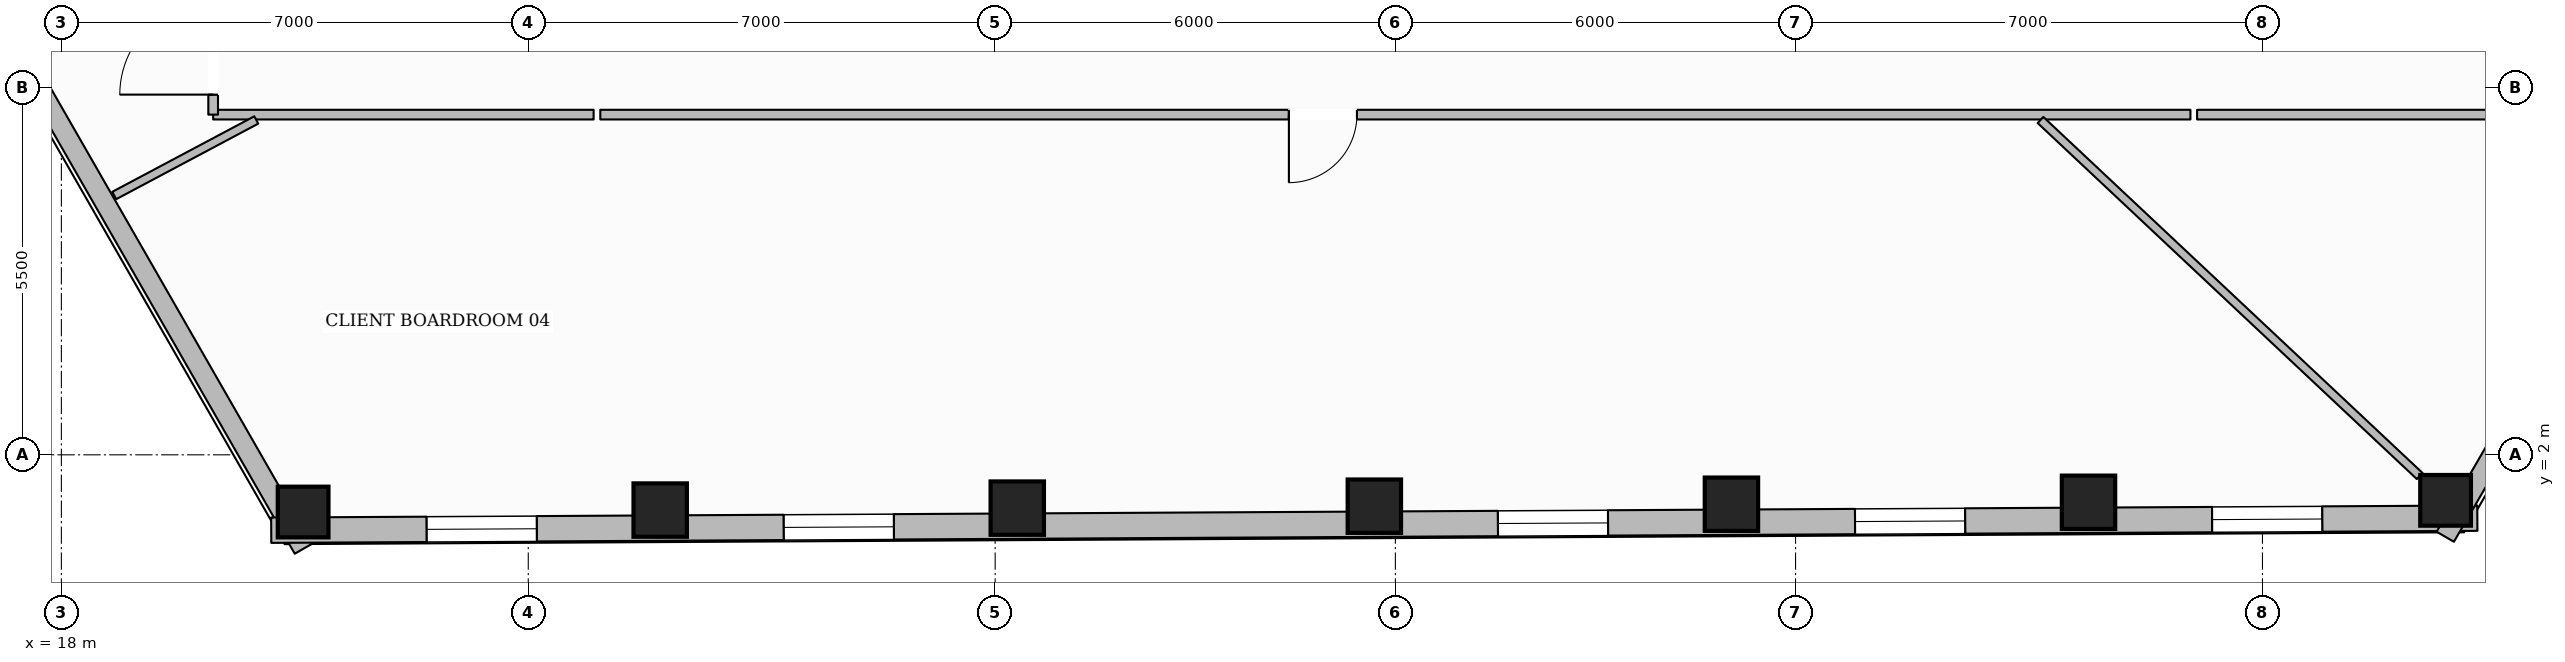
"""IFC4 building model, lengths in metres.
Left out: names, types, materials, properties, quantities, classifications, styles, units other than length and angle.
Written with IfcOpenShell. Run it as: python <this file> out.ifc"""

import sys

from ifc_helpers import new_model, si_unit, direction, frame, frame_2d, origin, origin_2d, place, context, subcontext, project, spatial, rectangle, hollow_rectangle, extrude, element, fill, save


model = new_model("IFC4")
c1 = context("Model", 3, precision=1e-05, world=origin(), true_north=direction((0.0, 1.0)))
c2 = subcontext(c1, "Body", "Model", "MODEL_VIEW")
j1 = project(units=[si_unit("LENGTHUNIT", "METRE"), si_unit("PLANEANGLEUNIT", "RADIAN")], contexts=[c1])
p1 = place(None, origin())
s1 = spatial("IfcSite", under=j1, at=p1, CompositionType="ELEMENT")
p2 = place(p1, origin())
s2 = spatial("IfcBuilding", under=s1, at=p2, CompositionType="ELEMENT")
p3 = place(p2, frame((0.0, 0.0, 6.0)))
s3 = spatial("IfcBuildingStorey", under=s2, at=p3, CompositionType="ELEMENT", Elevation=6.0)
p4 = place(p3, frame((21.625, 1.142, 0.0), z_axis=(0.0, 0.0, 1.0), x_axis=(1.0, 0.0, 0.0)))
e1 = element("IfcColumn", 1, at=p4, inside=s3, PredefinedType="COLUMN", context=c2, shape_type="SweptSolid", body=[
    extrude(hollow_rectangle(XDim=0.76, YDim=0.76, WallThickness=0.035, at=origin_2d()), origin(), (0.0, 0.0, 1.0), 3.59),
])
for number, where, z_axis, x_axis in (
    (2, (26.978, 1.172, 0.0), (0.0, 0.0, 1.0), (1.0, 0.0, 0.0)),
    (3, (32.332, 1.201, 0.0), (0.0, 0.0, 1.0), (1.0, 0.0, 0.0)),
    (4, (37.685, 1.23, 0.0), (0.0, 0.0, 1.0), (1.0, 0.0, 0.0)),
    (5, (43.039, 1.259, 0.0), (0.0, 0.0, 1.0), (1.0, 0.0, 0.0)),
    (6, (48.392, 1.288, 0.0), (0.0, 0.0, 1.0), (1.0, 0.0, 0.0)),
):
    element("IfcColumn", number, at=place(p3, frame(where, z_axis=z_axis, x_axis=x_axis)), inside=s3, PredefinedType="COLUMN", context=c2, shape_type="SweptSolid", body=[
        extrude(hollow_rectangle(XDim=0.8, YDim=0.8, WallThickness=0.036, at=origin_2d()), origin(), (0.0, 0.0, 1.0), 3.59),
    ])
p5 = place(p3, frame((53.746, 1.318, 0.0), z_axis=(0.0, 0.0, 1.0), x_axis=(1.0, 0.0, 0.0)))
e7 = element("IfcColumn", 7, at=p5, inside=s3, PredefinedType="COLUMN", context=c2, shape_type="SweptSolid", body=[
    extrude(hollow_rectangle(XDim=0.76, YDim=0.76, WallThickness=0.035, at=origin_2d()), origin(), (0.0, 0.0, 1.0), 3.59),
])
p6 = place(p3, frame((21.629, 0.592, 0.0), z_axis=(0.0, 0.0, 1.0), x_axis=(-0.497614882017, 0.867398080004, 0.0)))
e8 = element("IfcWall", 8, at=p6, inside=s3, PredefinedType="STANDARD", context=c2, shape_type="SweptSolid", body=[
    extrude(rectangle(XDim=17.324, YDim=0.3, at=frame_2d((8.662, 0.0))), origin(), (0.0, 0.0, 1.0), 2.97),
])
p7 = place(p6, frame((8.062, 0.0, 0.65)))
e9 = element("IfcOpeningElement", 9, at=p7, cuts=e8, PredefinedType="OPENING", context=c2, shape_type="SweptSolid", body=[
    extrude(rectangle(XDim=1.2, YDim=1.7, at=frame_2d((0.6, 0.85))), frame((0.0, 0.16, 0.0), z_axis=(0.0, -1.0, 0.0), x_axis=(1.0, 0.0, 0.0)), (0.0, 0.0, 1.0), 0.32),
])
p8 = place(p3, frame((54.221, 1.05, 0.0), z_axis=(0.0, 0.0, 1.0), x_axis=(-0.999985122688, -0.005454759556, 0.0)))
e10 = element("IfcWall", 10, at=p8, inside=s3, PredefinedType="STANDARD", context=c2, shape_type="SweptSolid", body=[
    extrude(rectangle(XDim=33.076, YDim=0.38, at=frame_2d((16.538, 0.0))), origin(), (0.0, 0.0, 1.0), 2.97),
])
p9 = place(p8, frame((29.094, 0.0, 0.65)))
e11 = element("IfcOpeningElement", 11, at=p9, cuts=e10, PredefinedType="OPENING", context=c2, shape_type="SweptSolid", body=[
    extrude(rectangle(XDim=1.65, YDim=1.75, at=frame_2d((0.825, 0.875))), frame((0.0, 0.2, 0.0), z_axis=(0.0, -1.0, 0.0), x_axis=(1.0, 0.0, 0.0)), (0.0, 0.0, 1.0), 0.4),
])
p10 = place(p8, frame((23.74, 0.0, 0.65)))
e12 = element("IfcOpeningElement", 12, at=p10, cuts=e10, PredefinedType="OPENING", context=c2, shape_type="SweptSolid", body=[
    extrude(rectangle(XDim=1.65, YDim=1.75, at=frame_2d((0.825, 0.875))), frame((0.0, 0.2, 0.0), z_axis=(0.0, -1.0, 0.0), x_axis=(1.0, 0.0, 0.0)), (0.0, 0.0, 1.0), 0.4),
])
p11 = place(p8, frame((13.033, 0.0, 0.65)))
e13 = element("IfcOpeningElement", 13, at=p11, cuts=e10, PredefinedType="OPENING", context=c2, shape_type="SweptSolid", body=[
    extrude(rectangle(XDim=1.65, YDim=1.75, at=frame_2d((0.825, 0.875))), frame((0.0, 0.2, 0.0), z_axis=(0.0, -1.0, 0.0), x_axis=(1.0, 0.0, 0.0)), (0.0, 0.0, 1.0), 0.4),
])
p12 = place(p8, frame((7.68, 0.0, 0.65)))
e14 = element("IfcOpeningElement", 14, at=p12, cuts=e10, PredefinedType="OPENING", context=c2, shape_type="SweptSolid", body=[
    extrude(rectangle(XDim=1.65, YDim=1.75, at=frame_2d((0.825, 0.875))), frame((0.0, 0.2, 0.0), z_axis=(0.0, -1.0, 0.0), x_axis=(1.0, 0.0, 0.0)), (0.0, 0.0, 1.0), 0.4),
])
p13 = place(p8, frame((2.326, 0.0, 0.65)))
e15 = element("IfcOpeningElement", 15, at=p13, cuts=e10, PredefinedType="OPENING", context=c2, shape_type="SweptSolid", body=[
    extrude(rectangle(XDim=1.65, YDim=1.75, at=frame_2d((0.825, 0.875))), frame((0.0, 0.2, 0.0), z_axis=(0.0, -1.0, 0.0), x_axis=(1.0, 0.0, 0.0)), (0.0, 0.0, 1.0), 0.4),
])
p14 = place(p3, frame((62.524, 15.89, 0.0), z_axis=(0.0, 0.0, 1.0), x_axis=(-0.502350077129, -0.864664327938, 0.0)))
e16 = element("IfcWall", 16, at=p14, inside=s3, PredefinedType="STANDARD", context=c2, shape_type="SweptSolid", body=[
    extrude(rectangle(XDim=17.485, YDim=0.3, at=frame_2d((8.742, 0.0))), origin(), (0.0, 0.0, 1.0), 2.97),
])
p15 = place(p14, frame((8.142, 0.0, 0.65)))
e17 = element("IfcOpeningElement", 17, at=p15, cuts=e16, PredefinedType="OPENING", context=c2, shape_type="SweptSolid", body=[
    extrude(rectangle(XDim=1.2, YDim=1.7, at=frame_2d((0.6, 0.85))), frame((0.0, 0.16, 0.0), z_axis=(0.0, -1.0, 0.0), x_axis=(1.0, 0.0, 0.0)), (0.0, 0.0, 1.0), 0.32),
])
p16 = place(p3, frame((55.04, 7.1, 0.0), z_axis=(0.0, 0.0, 1.0), x_axis=(-1.0, 0.0, 0.0)))
e18 = element("IfcWall", 18, at=p16, inside=s3, PredefinedType="PARTITIONING", context=c2, shape_type="SweptSolid", body=[
    extrude(rectangle(XDim=5.02, YDim=0.145, at=frame_2d((2.51, 0.0))), origin(), (0.0, 0.0, 1.0), 3.59),
])
p17 = place(p3, frame((49.92, 7.1, 0.0), z_axis=(0.0, 0.0, 1.0), x_axis=(-1.0, 0.0, 0.0)))
e19 = element("IfcWall", 19, at=p17, inside=s3, PredefinedType="PARTITIONING", context=c2, shape_type="SweptSolid", body=[
    extrude(rectangle(XDim=23.84, YDim=0.145, at=frame_2d((11.92, 0.0))), origin(), (0.0, 0.0, 1.0), 3.278),
])
p18 = place(p17, frame((12.496, 0.0, 0.0)))
e20 = element("IfcOpeningElement", 20, at=p18, cuts=e19, PredefinedType="OPENING", context=c2, shape_type="SweptSolid", body=[
    extrude(rectangle(XDim=1.02, YDim=2.15, at=frame_2d((0.51, 1.075))), frame((0.0, 0.083, 0.0), z_axis=(0.0, -1.0, 0.0), x_axis=(1.0, 0.0, 0.0)), (0.0, 0.0, 1.0), 0.165),
])
p19 = place(p3, frame((25.98, 7.1, 0.0), z_axis=(0.0, 0.0, 1.0), x_axis=(-1.0, 0.0, 0.0)))
e21 = element("IfcWall", 21, at=p19, inside=s3, PredefinedType="PARTITIONING", context=c2, shape_type="SweptSolid", body=[
    extrude(rectangle(XDim=5.704, YDim=0.145, at=frame_2d((2.852, 0.0))), origin(), (0.0, 0.0, 1.0), 3.59),
])
p20 = place(p3, frame((20.276, 7.1, 0.0), z_axis=(0.0, 0.0, 1.0), x_axis=(0.0, 1.0, 0.0)))
e22 = element("IfcWall", 22, at=p20, inside=s3, PredefinedType="PARTITIONING", context=c2, shape_type="SweptSolid", body=[
    extrude(rectangle(XDim=2.0, YDim=0.145, at=frame_2d((1.0, 0.0))), origin(), (0.0, 0.0, 1.0), 3.59),
])
p21 = place(p20, frame((0.3, 0.0, 0.0)))
e23 = element("IfcOpeningElement", 23, at=p21, cuts=e22, PredefinedType="OPENING", context=c2, shape_type="SweptSolid", body=[
    extrude(rectangle(XDim=1.4, YDim=2.2, at=frame_2d((0.7, 1.1))), frame((0.0, 0.083, 0.0), z_axis=(0.0, -1.0, 0.0), x_axis=(1.0, 0.0, 0.0)), (0.0, 0.0, 1.0), 0.165),
])
p22 = place(p3, frame((20.922, 7.02, 0.0), z_axis=(0.0, 0.0, 1.0), x_axis=(-0.882971496937, -0.469426602992, 0.0)))
e24 = element("IfcWall", 24, at=p22, inside=s3, PredefinedType="PARTITIONING", context=c2, shape_type="SweptSolid", body=[
    extrude(rectangle(XDim=2.412, YDim=0.125, at=frame_2d((1.206, 0.0))), origin(), (0.0, 0.0, 1.0), 3.59),
])
p23 = place(p3, frame((47.672, 7.02, 0.0), z_axis=(0.0, 0.0, 1.0), x_axis=(0.729045932386, -0.684464775186, 0.0)))
e25 = element("IfcWall", 25, at=p23, inside=s3, PredefinedType="PARTITIONING", context=c2, shape_type="SweptSolid", body=[
    extrude(rectangle(XDim=7.798, YDim=0.125, at=frame_2d((3.899, 0.0))), origin(), (0.0, 0.0, 1.0), 3.057),
])
p24 = place(p9, origin())
e26 = element("IfcWindow", 26, at=p24, inside=s3, PartitioningType="SINGLE_PANEL", PredefinedType="WINDOW", context=c2, shape_type="SweptSolid", body=[
    extrude(rectangle(XDim=1.65, YDim=1.75, at=frame_2d((0.825, 0.875))), frame((0.0, 0.03, 0.0), z_axis=(0.0, -1.0, 0.0), x_axis=(1.0, 0.0, 0.0)), (0.0, 0.0, 1.0), 0.06),
])
fill(e11, e26)
p25 = place(p10, origin())
e27 = element("IfcWindow", 27, at=p25, inside=s3, PartitioningType="SINGLE_PANEL", PredefinedType="WINDOW", context=c2, shape_type="SweptSolid", body=[
    extrude(rectangle(XDim=1.65, YDim=1.75, at=frame_2d((0.825, 0.875))), frame((0.0, 0.03, 0.0), z_axis=(0.0, -1.0, 0.0), x_axis=(1.0, 0.0, 0.0)), (0.0, 0.0, 1.0), 0.06),
])
fill(e12, e27)
p26 = place(p11, origin())
e28 = element("IfcWindow", 28, at=p26, inside=s3, PartitioningType="SINGLE_PANEL", PredefinedType="WINDOW", context=c2, shape_type="SweptSolid", body=[
    extrude(rectangle(XDim=1.65, YDim=1.75, at=frame_2d((0.825, 0.875))), frame((0.0, 0.03, 0.0), z_axis=(0.0, -1.0, 0.0), x_axis=(1.0, 0.0, 0.0)), (0.0, 0.0, 1.0), 0.06),
])
fill(e13, e28)
p27 = place(p12, origin())
e29 = element("IfcWindow", 29, at=p27, inside=s3, PartitioningType="SINGLE_PANEL", PredefinedType="WINDOW", context=c2, shape_type="SweptSolid", body=[
    extrude(rectangle(XDim=1.65, YDim=1.75, at=frame_2d((0.825, 0.875))), frame((0.0, 0.03, 0.0), z_axis=(0.0, -1.0, 0.0), x_axis=(1.0, 0.0, 0.0)), (0.0, 0.0, 1.0), 0.06),
])
fill(e14, e29)
p28 = place(p13, origin())
e30 = element("IfcWindow", 30, at=p28, inside=s3, PartitioningType="SINGLE_PANEL", PredefinedType="WINDOW", context=c2, shape_type="SweptSolid", body=[
    extrude(rectangle(XDim=1.65, YDim=1.75, at=frame_2d((0.825, 0.875))), frame((0.0, 0.03, 0.0), z_axis=(0.0, -1.0, 0.0), x_axis=(1.0, 0.0, 0.0)), (0.0, 0.0, 1.0), 0.06),
])
fill(e15, e30)
p29 = place(p21, origin())
e31 = element("IfcDoor", 31, at=p29, inside=s3, OperationType="SINGLE_SWING_LEFT", PredefinedType="DOOR", context=c2, shape_type="SweptSolid", body=[
    extrude(rectangle(XDim=1.4, YDim=2.2, at=frame_2d((0.7, 1.1))), frame((0.0, 0.025, 0.0), z_axis=(0.0, -1.0, 0.0), x_axis=(1.0, 0.0, 0.0)), (0.0, 0.0, 1.0), 0.05),
])
fill(e23, e31)
p30 = place(p18, origin())
e32 = element("IfcDoor", 32, at=p30, inside=s3, OperationType="SINGLE_SWING_RIGHT", PredefinedType="DOOR", context=c2, shape_type="SweptSolid", body=[
    extrude(rectangle(XDim=1.02, YDim=2.15, at=frame_2d((0.51, 1.075))), frame((0.0, 0.025, 0.0), z_axis=(0.0, -1.0, 0.0), x_axis=(1.0, 0.0, 0.0)), (0.0, 0.0, 1.0), 0.05),
])
fill(e20, e32)
save(model, sys.argv[1])
